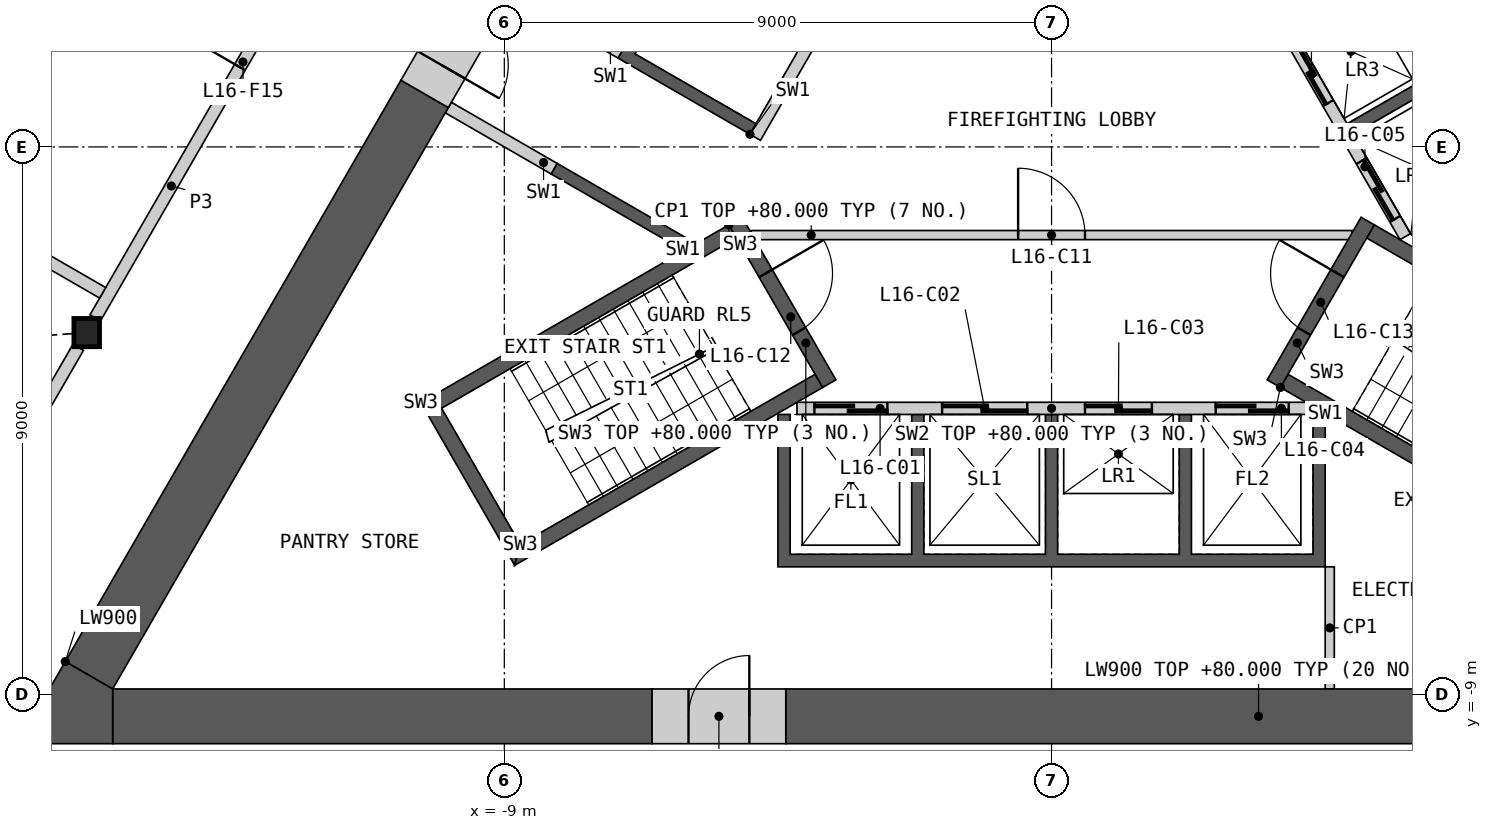
"""IFC4 building model, lengths in metres.
Left out: names, types, materials, properties, quantities, classifications, styles, units other than length and angle.
Written with IfcOpenShell. Run it as: python <this file> out.ifc"""

import sys

from ifc_helpers import new_model, si_unit, direction, frame, frame_2d, origin, origin_2d, place, context, subcontext, project, spatial, polyline, rectangle, i_section, outline, extrude, element, fill, save


model = new_model("IFC4")
c1 = context("Model", 3, precision=1e-05, world=origin(), true_north=direction((0.0, 1.0)))
c2 = subcontext(c1, "Body", "Model", "MODEL_VIEW")
j1 = project(units=[si_unit("LENGTHUNIT", "METRE"), si_unit("PLANEANGLEUNIT", "RADIAN")], contexts=[c1])
p1 = place(None, origin())
s1 = spatial("IfcSite", under=j1, at=p1, CompositionType="ELEMENT")
p2 = place(p1, origin())
s2 = spatial("IfcBuilding", under=s1, at=p2, CompositionType="ELEMENT")
p3 = place(p2, frame((0.0, 0.0, 76.2)))
s3 = spatial("IfcBuildingStorey", under=s2, at=p3, CompositionType="ELEMENT", Elevation=76.2)
p4 = place(p3, frame((-15.868, -3.054, 0.0), z_axis=(0.0, 0.0, 1.0), x_axis=(1.0, 0.0, 0.0)))
e1 = element("IfcColumn", 1, at=p4, inside=s3, PredefinedType="COLUMN", context=c2, shape_type="SweptSolid", body=[
    extrude(i_section(OverallWidth=0.421, OverallDepth=0.465, WebThickness=0.045, FlangeThickness=0.072, at=origin_2d()), origin(), (0.0, 0.0, 1.0), 4.2),
])
p5 = place(p3, origin())
e2 = element("IfcWall", 2, at=p5, inside=s3, PredefinedType="SHEAR", context=c2, shape_type="SweptSolid", body=[
    extrude(outline(polyline([(4.5, -4.4), (4.5, -6.906), (-4.5, -6.906), (-4.5, -4.4), (-4.3, -4.4), (-4.3, -6.7), (-2.3, -6.7), (-2.3, -4.4), (-2.1, -4.4), (-2.1, -6.7), (-0.1, -6.7), (-0.1, -4.4), (0.1, -4.4), (0.1, -6.7), (2.1, -6.7), (2.1, -4.4), (2.3, -4.4), (2.3, -6.7), (4.3, -6.7), (4.3, -4.4), (4.5, -4.4)])), origin(), (0.0, 0.0, 1.0), 3.8),
])
p6 = place(p3, frame((-4.187, -4.3, 0.0), z_axis=(0.0, 0.0, 1.0), x_axis=(1.0, 0.0, 0.0)))
e3 = element("IfcWall", 3, at=p6, inside=s3, PredefinedType="SOLIDWALL", context=c2, shape_type="SweptSolid", body=[
    extrude(rectangle(XDim=8.373, YDim=0.2, at=frame_2d((4.187, 0.0))), origin(), (0.0, 0.0, 1.0), 3.8),
])
p7 = place(p6, frame((0.287, 0.0, 0.0)))
e4 = element("IfcOpeningElement", 4, at=p7, cuts=e3, PredefinedType="OPENING", context=c2, shape_type="SweptSolid", body=[
    extrude(rectangle(XDim=1.2, YDim=2.1, at=frame_2d((0.6, 1.05))), frame((0.0, 0.11, 0.0), z_axis=(0.0, -1.0, 0.0), x_axis=(1.0, 0.0, 0.0)), (0.0, 0.0, 1.0), 0.22),
])
p8 = place(p6, frame((2.387, 0.0, 0.0)))
e5 = element("IfcOpeningElement", 5, at=p8, cuts=e3, PredefinedType="OPENING", context=c2, shape_type="SweptSolid", body=[
    extrude(rectangle(XDim=1.4, YDim=2.1, at=frame_2d((0.7, 1.05))), frame((0.0, 0.11, 0.0), z_axis=(0.0, -1.0, 0.0), x_axis=(1.0, 0.0, 0.0)), (0.0, 0.0, 1.0), 0.22),
])
p9 = place(p6, frame((4.737, 0.0, 0.0)))
e6 = element("IfcOpeningElement", 6, at=p9, cuts=e3, PredefinedType="OPENING", context=c2, shape_type="SweptSolid", body=[
    extrude(rectangle(XDim=1.1, YDim=2.1, at=frame_2d((0.55, 1.05))), frame((0.0, 0.11, 0.0), z_axis=(0.0, -1.0, 0.0), x_axis=(1.0, 0.0, 0.0)), (0.0, 0.0, 1.0), 0.22),
])
p10 = place(p6, frame((6.887, 0.0, 0.0)))
e7 = element("IfcOpeningElement", 7, at=p10, cuts=e3, PredefinedType="OPENING", context=c2, shape_type="SweptSolid", body=[
    extrude(rectangle(XDim=1.2, YDim=2.1, at=frame_2d((0.6, 1.05))), frame((0.0, 0.11, 0.0), z_axis=(0.0, -1.0, 0.0), x_axis=(1.0, 0.0, 0.0)), (0.0, 0.0, 1.0), 0.22),
])
p11 = place(p3, origin())
e8 = element("IfcWall", 8, at=p11, inside=s3, PredefinedType="SHEAR", context=c2, shape_type="SweptSolid", body=[
    extrude(outline(polyline([(2.66, 4.192), (4.831, 5.445), (8.231, -0.444), (6.061, -1.697), (5.96, -1.524), (7.952, -0.374), (6.952, 1.358), (4.96, 0.208), (4.861, 0.381), (6.852, 1.531), (5.852, 3.263), (3.861, 2.113), (3.76, 2.287), (5.752, 3.437), (4.752, 5.169), (2.76, 4.019), (2.66, 4.192)])), origin(), (0.0, 0.0, 1.0), 3.8),
])
p12 = place(p3, frame((5.817, -1.476, 0.0), z_axis=(0.0, 0.0, 1.0), x_axis=(-0.500002616675, 0.866023893041, 0.0)))
e9 = element("IfcWall", 9, at=p12, inside=s3, PredefinedType="SOLIDWALL", context=c2, shape_type="SweptSolid", body=[
    extrude(rectangle(XDim=8.373, YDim=0.2, at=frame_2d((4.187, 0.0))), origin(), (0.0, 0.0, 1.0), 3.8),
])
p13 = place(p12, frame((0.337, 0.0, 0.0)))
e10 = element("IfcOpeningElement", 10, at=p13, cuts=e9, PredefinedType="OPENING", context=c2, shape_type="SweptSolid", body=[
    extrude(rectangle(XDim=1.1, YDim=2.1, at=frame_2d((0.55, 1.05))), frame((0.0, 0.11, 0.0), z_axis=(0.0, -1.0, 0.0), x_axis=(1.0, 0.0, 0.0)), (0.0, 0.0, 1.0), 0.22),
])
p14 = place(p12, frame((2.537, 0.0, 0.0)))
e11 = element("IfcOpeningElement", 11, at=p14, cuts=e9, PredefinedType="OPENING", context=c2, shape_type="SweptSolid", body=[
    extrude(rectangle(XDim=1.1, YDim=2.1, at=frame_2d((0.55, 1.05))), frame((0.0, 0.11, 0.0), z_axis=(0.0, -1.0, 0.0), x_axis=(1.0, 0.0, 0.0)), (0.0, 0.0, 1.0), 0.22),
])
p15 = place(p12, frame((4.737, 0.0, 0.0)))
e12 = element("IfcOpeningElement", 12, at=p15, cuts=e9, PredefinedType="OPENING", context=c2, shape_type="SweptSolid", body=[
    extrude(rectangle(XDim=1.1, YDim=2.1, at=frame_2d((0.55, 1.05))), frame((0.0, 0.11, 0.0), z_axis=(0.0, -1.0, 0.0), x_axis=(1.0, 0.0, 0.0)), (0.0, 0.0, 1.0), 0.22),
])
p16 = place(p12, frame((7.037, 0.0, 0.0)))
e13 = element("IfcOpeningElement", 13, at=p16, cuts=e9, PredefinedType="OPENING", context=c2, shape_type="SweptSolid", body=[
    extrude(rectangle(XDim=0.9, YDim=2.1, at=frame_2d((0.45, 1.05))), frame((0.0, 0.11, 0.0), z_axis=(0.0, -1.0, 0.0), x_axis=(1.0, 0.0, 0.0)), (0.0, 0.0, 1.0), 0.22),
])
p17 = place(p3, origin())
e14 = element("IfcWall", 14, at=p17, inside=s3, PredefinedType="SHEAR", context=c2, shape_type="SweptSolid", body=[
    extrude(outline(polyline([(-6.061, -1.697), (-8.231, -0.444), (-8.131, -0.271), (-5.96, -1.524), (-6.061, -1.697)])), origin(), (0.0, 0.0, 1.0), 3.8),
])
p18 = place(p3, origin())
e15 = element("IfcWall", 15, at=p18, inside=s3, PredefinedType="SHEAR", context=c2, shape_type="SweptSolid", body=[
    extrude(outline(polyline([(-4.96, 0.208), (-7.131, 1.461), (-5.931, 3.54), (-3.76, 2.287), (-3.861, 2.113), (-5.852, 3.263), (-6.852, 1.531), (-4.861, 0.381), (-4.96, 0.208)])), origin(), (0.0, 0.0, 1.0), 3.8),
])
p19 = place(p3, frame((-1.631, 5.776, 0.0), z_axis=(0.0, 0.0, 1.0), x_axis=(-0.499992876559, -0.866029516466, 0.0)))
e16 = element("IfcWall", 16, at=p19, inside=s3, PredefinedType="SOLIDWALL", context=c2, shape_type="SweptSolid", body=[
    extrude(rectangle(XDim=6.486, YDim=0.2, at=frame_2d((3.243, 0.0))), origin(), (0.0, 0.0, 1.0), 3.8),
])
p20 = place(p19, frame((0.437, 0.0, 0.0)))
e17 = element("IfcOpeningElement", 17, at=p20, cuts=e16, PredefinedType="OPENING", context=c2, shape_type="SweptSolid", body=[
    extrude(rectangle(XDim=0.9, YDim=2.1, at=frame_2d((0.45, 1.05))), frame((0.0, 0.11, 0.0), z_axis=(0.0, -1.0, 0.0), x_axis=(1.0, 0.0, 0.0)), (0.0, 0.0, 1.0), 0.22),
])
p21 = place(p19, frame((2.637, 0.0, 0.0)))
e18 = element("IfcOpeningElement", 18, at=p21, cuts=e16, PredefinedType="OPENING", context=c2, shape_type="SweptSolid", body=[
    extrude(rectangle(XDim=0.9, YDim=2.1, at=frame_2d((0.45, 1.05))), frame((0.0, 0.11, 0.0), z_axis=(0.0, -1.0, 0.0), x_axis=(1.0, 0.0, 0.0)), (0.0, 0.0, 1.0), 0.22),
])
p22 = place(p3, frame((-7.081, 1.548, 0.0), z_axis=(0.0, 0.0, 1.0), x_axis=(-0.865983199114, 0.50007309351, 0.0)))
e19 = element("IfcWall", 19, at=p22, inside=s3, PredefinedType="SHEAR", context=c2, shape_type="SweptSolid", body=[
    extrude(rectangle(XDim=2.009, YDim=0.2, at=frame_2d((1.004, 0.0))), origin(), (0.0, 0.0, 1.0), 3.8),
])
p23 = place(p3, frame((-8.181, -0.357, 0.0), z_axis=(0.0, 0.0, 1.0), x_axis=(-0.866035824272, 0.499981950752, 0.0)))
e20 = element("IfcWall", 20, at=p23, inside=s3, PredefinedType="SHEAR", context=c2, shape_type="SweptSolid", body=[
    extrude(rectangle(XDim=2.009, YDim=0.2, at=frame_2d((1.004, 0.0))), origin(), (0.0, 0.0, 1.0), 3.8),
])
p24 = place(p3, frame((-4.941, -1.45, 0.0), z_axis=(0.0, 0.0, 1.0), x_axis=(1.0, 0.0, 0.0)))
e21 = element("IfcWall", 21, at=p24, inside=s3, PredefinedType="PARTITIONING", context=c2, shape_type="SweptSolid", body=[
    extrude(rectangle(XDim=9.882, YDim=0.15, at=frame_2d((4.941, 0.0))), origin(), (0.0, 0.0, 1.0), 3.8),
])
p25 = place(p24, frame((4.391, 0.0, 0.0)))
e22 = element("IfcOpeningElement", 22, at=p25, cuts=e21, PredefinedType="OPENING", context=c2, shape_type="SweptSolid", body=[
    extrude(rectangle(XDim=1.1, YDim=2.1, at=frame_2d((0.55, 1.05))), frame((0.0, 0.085, 0.0), z_axis=(0.0, -1.0, 0.0), x_axis=(1.0, 0.0, 0.0)), (0.0, 0.0, 1.0), 0.17),
])
p26 = place(p3, origin())
e23 = element("IfcWall", 23, at=p26, inside=s3, PredefinedType="SHEAR", context=c2, shape_type="SweptSolid", body=[
    extrude(outline(polyline([(-5.307, -1.281), (-10.374, -4.206), (-10.032, -4.298), (-5.182, -1.498), (-5.307, -1.281)])), origin(), (0.0, 0.0, 1.0), 3.8),
])
p27 = place(p3, origin())
e24 = element("IfcWall", 24, at=p27, inside=s3, PredefinedType="SHEAR", context=c2, shape_type="SweptSolid", body=[
    extrude(outline(polyline([(-10.374, -4.206), (-8.83, -6.881), (-8.738, -6.539), (-10.032, -4.298), (-10.374, -4.206)])), origin(), (0.0, 0.0, 1.0), 3.8),
])
p28 = place(p3, origin())
e25 = element("IfcWall", 25, at=p28, inside=s3, PredefinedType="SHEAR", context=c2, shape_type="SweptSolid", body=[
    extrude(outline(polyline([(-8.738, -6.539), (-8.83, -6.881), (-3.763, -3.956), (-3.888, -3.739), (-8.738, -6.539)])), origin(), (0.0, 0.0, 1.0), 3.8),
])
p29 = place(p3, frame((-5.199, -1.219, 0.0), z_axis=(0.0, 0.0, 1.0), x_axis=(0.499982516597, -0.866035497597, 0.0)))
e26 = element("IfcWall", 26, at=p29, inside=s3, PredefinedType="SHEAR", context=c2, shape_type="SweptSolid", body=[
    extrude(rectangle(XDim=3.088, YDim=0.25, at=frame_2d((1.544, 0.0))), origin(), (0.0, 0.0, 1.0), 3.8),
])
p30 = place(p29, frame((0.994, 0.0, 0.0)))
e27 = element("IfcOpeningElement", 27, at=p30, cuts=e26, PredefinedType="OPENING", context=c2, shape_type="SweptSolid", body=[
    extrude(rectangle(XDim=1.1, YDim=2.1, at=frame_2d((0.55, 1.05))), frame((0.0, 0.135, 0.0), z_axis=(0.0, -1.0, 0.0), x_axis=(1.0, 0.0, 0.0)), (0.0, 0.0, 1.0), 0.27),
])
p31 = place(p3, origin())
e28 = element("IfcWall", 28, at=p31, inside=s3, PredefinedType="SHEAR", context=c2, shape_type="SweptSolid", body=[
    extrude(outline(polyline([(3.763, -3.956), (8.83, -6.881), (8.738, -6.539), (3.888, -3.739), (3.763, -3.956)])), origin(), (0.0, 0.0, 1.0), 3.8),
])
p32 = place(p3, origin())
e29 = element("IfcWall", 29, at=p32, inside=s3, PredefinedType="SHEAR", context=c2, shape_type="SweptSolid", body=[
    extrude(outline(polyline([(10.032, -4.298), (10.374, -4.206), (5.307, -1.281), (5.182, -1.498), (10.032, -4.298)])), origin(), (0.0, 0.0, 1.0), 3.8),
])
p33 = place(p3, frame((3.655, -3.893, 0.0), z_axis=(0.0, 0.0, 1.0), x_axis=(0.499982516597, 0.866035497597, 0.0)))
e30 = element("IfcWall", 30, at=p33, inside=s3, PredefinedType="SHEAR", context=c2, shape_type="SweptSolid", body=[
    extrude(rectangle(XDim=3.088, YDim=0.25, at=frame_2d((1.544, 0.0))), origin(), (0.0, 0.0, 1.0), 3.8),
])
p34 = place(p33, frame((0.994, 0.0, 0.0)))
e31 = element("IfcOpeningElement", 31, at=p34, cuts=e30, PredefinedType="OPENING", context=c2, shape_type="SweptSolid", body=[
    extrude(rectangle(XDim=1.1, YDim=2.1, at=frame_2d((0.55, 1.05))), frame((0.0, 0.135, 0.0), z_axis=(0.0, -1.0, 0.0), x_axis=(1.0, 0.0, 0.0)), (0.0, 0.0, 1.0), 0.27),
])
p35 = place(p3, frame((4.575, -6.906, 0.0), z_axis=(0.0, 0.0, 1.0), x_axis=(0.0, -1.0, 0.0)))
e32 = element("IfcWall", 32, at=p35, inside=s3, PredefinedType="PARTITIONING", context=c2, shape_type="SweptSolid", body=[
    extrude(rectangle(XDim=2.009, YDim=0.15, at=frame_2d((1.004, 0.0))), origin(), (0.0, 0.0, 1.0), 3.8),
])
p36 = place(p3, frame((-4.371, -9.365, 0.0), z_axis=(0.0, 0.0, 1.0), x_axis=(1.0, 0.0, 0.0)))
e33 = element("IfcWall", 33, at=p36, inside=s3, PredefinedType="SHEAR", context=c2, shape_type="SweptSolid", body=[
    extrude(rectangle(XDim=15.55, YDim=0.9, at=frame_2d((7.775, 0.0))), origin(), (0.0, 0.0, 1.0), 3.8),
])
p37 = place(p3, frame((-15.441, -9.365, 0.0), z_axis=(0.0, 0.0, 1.0), x_axis=(1.0, 0.0, 0.0)))
e34 = element("IfcWall", 34, at=p37, inside=s3, PredefinedType="SHEAR", context=c2, shape_type="SweptSolid", body=[
    extrude(rectangle(XDim=8.871, YDim=0.9, at=frame_2d((4.435, 0.0))), origin(), (0.0, 0.0, 1.0), 3.8),
])
p38 = place(p3, frame((-10.31, 0.872, 0.0), z_axis=(0.0, 0.0, 1.0), x_axis=(-0.499991697393, -0.866030197244, 0.0)))
e35 = element("IfcWall", 35, at=p38, inside=s3, PredefinedType="SHEAR", context=c2, shape_type="SweptSolid", body=[
    extrude(rectangle(XDim=11.041, YDim=0.9, at=frame_2d((5.521, 0.0))), origin(), (0.0, 0.0, 1.0), 3.8),
])
p39 = place(p3, origin())
e36 = element("IfcWall", 36, at=p39, inside=s3, PredefinedType="SHEAR", context=c2, shape_type="SweptSolid", body=[
    extrude(outline(polyline([(-16.221, -8.465), (-15.441, -8.915), (-15.441, -9.815), (-17.0, -9.815), (-16.221, -8.465)])), origin(), (0.0, 0.0, 1.0), 3.8),
])
p40 = place(p3, frame((-6.571, -9.365, 0.0), z_axis=(0.0, 0.0, 1.0), x_axis=(1.0, 0.0, 0.0)))
e37 = element("IfcWall", 37, at=p40, inside=s3, PredefinedType="SHEAR", context=c2, shape_type="SweptSolid", body=[
    extrude(rectangle(XDim=2.2, YDim=0.9, at=frame_2d((1.1, 0.0))), origin(), (0.0, 0.0, 1.0), 3.8),
])
p41 = place(p40, frame((0.6, 0.0, 0.0)))
e38 = element("IfcOpeningElement", 38, at=p41, cuts=e37, PredefinedType="OPENING", context=c2, shape_type="SweptSolid", body=[
    extrude(rectangle(XDim=1.0, YDim=2.1, at=frame_2d((0.5, 1.05))), frame((0.0, 0.46, 0.0), z_axis=(0.0, -1.0, 0.0), x_axis=(1.0, 0.0, 0.0)), (0.0, 0.0, 1.0), 0.92),
])
p42 = place(p3, frame((-9.21, 2.777, 0.0), z_axis=(0.0, 0.0, 1.0), x_axis=(-0.500077893725, -0.86598042715, 0.0)))
e39 = element("IfcWall", 39, at=p42, inside=s3, PredefinedType="SHEAR", context=c2, shape_type="SweptSolid", body=[
    extrude(rectangle(XDim=2.2, YDim=0.9, at=frame_2d((1.1, 0.0))), origin(), (0.0, 0.0, 1.0), 3.8),
])
p43 = place(p42, frame((0.55, 0.0, 0.0)))
e40 = element("IfcOpeningElement", 40, at=p43, cuts=e39, PredefinedType="OPENING", context=c2, shape_type="SweptSolid", body=[
    extrude(rectangle(XDim=1.1, YDim=2.1, at=frame_2d((0.55, 1.05))), frame((0.0, 0.46, 0.0), z_axis=(0.0, -1.0, 0.0), x_axis=(1.0, 0.0, 0.0)), (0.0, 0.0, 1.0), 0.92),
])
p44 = place(p3, frame((-15.728, -2.811, 0.0), z_axis=(0.0, 0.0, 1.0), x_axis=(0.49999175339, 0.866030164915, 0.0)))
e41 = element("IfcWall", 41, at=p44, inside=s3, PredefinedType="PARTITIONING", context=c2, shape_type="SweptSolid", body=[
    extrude(rectangle(XDim=10.019, YDim=0.2, at=frame_2d((5.009, 0.0))), origin(), (0.0, 0.0, 1.0), 3.8),
])
p45 = place(p44, frame((4.76, 0.0, 0.0)))
e42 = element("IfcOpeningElement", 42, at=p45, cuts=e41, PredefinedType="OPENING", context=c2, shape_type="SweptSolid", body=[
    extrude(rectangle(XDim=1.0, YDim=2.1, at=frame_2d((0.5, 1.05))), frame((0.0, 0.11, 0.0), z_axis=(0.0, -1.0, 0.0), x_axis=(1.0, 0.0, 0.0)), (0.0, 0.0, 1.0), 0.22),
])
p46 = place(p3, frame((-19.244, -8.902, 0.0), z_axis=(0.0, 0.0, 1.0), x_axis=(0.499984737558, 0.86603421538, 0.0)))
e43 = element("IfcWall", 43, at=p46, inside=s3, PredefinedType="PARTITIONING", context=c2, shape_type="SweptSolid", body=[
    extrude(rectangle(XDim=6.473, YDim=0.2, at=frame_2d((3.236, 0.0))), origin(), (0.0, 0.0, 1.0), 3.8),
])
p47 = place(p46, frame((2.787, 0.0, 0.0)))
e44 = element("IfcOpeningElement", 44, at=p47, cuts=e43, PredefinedType="OPENING", context=c2, shape_type="SweptSolid", body=[
    extrude(rectangle(XDim=1.0, YDim=2.1, at=frame_2d((0.5, 1.05))), frame((0.0, 0.11, 0.0), z_axis=(0.0, -1.0, 0.0), x_axis=(1.0, 0.0, 0.0)), (0.0, 0.0, 1.0), 0.22),
])
p48 = place(p3, frame((-26.913, 4.129, 0.0), z_axis=(0.0, 0.0, 1.0), x_axis=(0.866026475891, -0.499998143053, 0.0)))
e45 = element("IfcWall", 45, at=p48, inside=s3, PredefinedType="PARTITIONING", context=c2, shape_type="SweptSolid", body=[
    extrude(rectangle(XDim=13.057, YDim=0.2, at=frame_2d((6.529, 0.0))), origin(), (0.0, 0.0, 1.0), 2.885),
])
p49 = place(p7, origin())
e46 = element("IfcDoor", 46, at=p49, inside=s3, OperationType="SLIDING_TO_LEFT", PredefinedType="DOOR", context=c2, shape_type="SweptSolid", body=[
    extrude(rectangle(XDim=1.2, YDim=2.1, at=frame_2d((0.6, 1.05))), frame((0.0, 0.025, 0.0), z_axis=(0.0, -1.0, 0.0), x_axis=(1.0, 0.0, 0.0)), (0.0, 0.0, 1.0), 0.05),
])
fill(e4, e46)
p50 = place(p8, origin())
e47 = element("IfcDoor", 47, at=p50, inside=s3, OperationType="SLIDING_TO_LEFT", PredefinedType="DOOR", context=c2, shape_type="SweptSolid", body=[
    extrude(rectangle(XDim=1.4, YDim=2.1, at=frame_2d((0.7, 1.05))), frame((0.0, 0.025, 0.0), z_axis=(0.0, -1.0, 0.0), x_axis=(1.0, 0.0, 0.0)), (0.0, 0.0, 1.0), 0.05),
])
fill(e5, e47)
p51 = place(p9, origin())
e48 = element("IfcDoor", 48, at=p51, inside=s3, OperationType="SLIDING_TO_LEFT", PredefinedType="DOOR", context=c2, shape_type="SweptSolid", body=[
    extrude(rectangle(XDim=1.1, YDim=2.1, at=frame_2d((0.55, 1.05))), frame((0.0, 0.025, 0.0), z_axis=(0.0, -1.0, 0.0), x_axis=(1.0, 0.0, 0.0)), (0.0, 0.0, 1.0), 0.05),
])
fill(e6, e48)
p52 = place(p10, origin())
e49 = element("IfcDoor", 49, at=p52, inside=s3, OperationType="SLIDING_TO_LEFT", PredefinedType="DOOR", context=c2, shape_type="SweptSolid", body=[
    extrude(rectangle(XDim=1.2, YDim=2.1, at=frame_2d((0.6, 1.05))), frame((0.0, 0.025, 0.0), z_axis=(0.0, -1.0, 0.0), x_axis=(1.0, 0.0, 0.0)), (0.0, 0.0, 1.0), 0.05),
])
fill(e7, e49)
p53 = place(p13, origin())
e50 = element("IfcDoor", 50, at=p53, inside=s3, OperationType="SLIDING_TO_LEFT", PredefinedType="DOOR", context=c2, shape_type="SweptSolid", body=[
    extrude(rectangle(XDim=1.1, YDim=2.1, at=frame_2d((0.55, 1.05))), frame((0.0, 0.025, 0.0), z_axis=(0.0, -1.0, 0.0), x_axis=(1.0, 0.0, 0.0)), (0.0, 0.0, 1.0), 0.05),
])
fill(e10, e50)
p54 = place(p14, origin())
e51 = element("IfcDoor", 51, at=p54, inside=s3, OperationType="SLIDING_TO_LEFT", PredefinedType="DOOR", context=c2, shape_type="SweptSolid", body=[
    extrude(rectangle(XDim=1.1, YDim=2.1, at=frame_2d((0.55, 1.05))), frame((0.0, 0.025, 0.0), z_axis=(0.0, -1.0, 0.0), x_axis=(1.0, 0.0, 0.0)), (0.0, 0.0, 1.0), 0.05),
])
fill(e11, e51)
p55 = place(p25, origin())
e52 = element("IfcDoor", 52, at=p55, inside=s3, OperationType="SINGLE_SWING_LEFT", PredefinedType="DOOR", context=c2, shape_type="SweptSolid", body=[
    extrude(rectangle(XDim=1.1, YDim=2.1, at=frame_2d((0.55, 1.05))), frame((0.0, 0.025, 0.0), z_axis=(0.0, -1.0, 0.0), x_axis=(1.0, 0.0, 0.0)), (0.0, 0.0, 1.0), 0.05),
])
fill(e22, e52)
p56 = place(p30, origin())
e53 = element("IfcDoor", 53, at=p56, inside=s3, OperationType="SINGLE_SWING_LEFT", PredefinedType="DOOR", context=c2, shape_type="SweptSolid", body=[
    extrude(rectangle(XDim=1.1, YDim=2.1, at=frame_2d((0.55, 1.05))), frame((0.0, 0.025, 0.0), z_axis=(0.0, -1.0, 0.0), x_axis=(1.0, 0.0, 0.0)), (0.0, 0.0, 1.0), 0.05),
])
fill(e27, e53)
p57 = place(p34, origin())
e54 = element("IfcDoor", 54, at=p57, inside=s3, OperationType="SINGLE_SWING_RIGHT", PredefinedType="DOOR", context=c2, shape_type="SweptSolid", body=[
    extrude(rectangle(XDim=1.1, YDim=2.1, at=frame_2d((0.55, 1.05))), frame((0.0, 0.025, 0.0), z_axis=(0.0, -1.0, 0.0), x_axis=(1.0, 0.0, 0.0)), (0.0, 0.0, 1.0), 0.05),
])
fill(e31, e54)
p58 = place(p41, origin())
e55 = element("IfcDoor", 55, at=p58, inside=s3, OperationType="SINGLE_SWING_RIGHT", PredefinedType="DOOR", context=c2, shape_type="SweptSolid", body=[
    extrude(rectangle(XDim=1.0, YDim=2.1, at=frame_2d((0.5, 1.05))), frame((0.0, 0.205, 0.0), z_axis=(0.0, -1.0, 0.0), x_axis=(1.0, 0.0, 0.0)), (0.0, 0.0, 1.0), 0.05),
])
fill(e38, e55)
p59 = place(p43, origin())
e56 = element("IfcDoor", 56, at=p59, inside=s3, OperationType="SINGLE_SWING_RIGHT", PredefinedType="DOOR", context=c2, shape_type="SweptSolid", body=[
    extrude(rectangle(XDim=1.1, YDim=2.1, at=frame_2d((0.55, 1.05))), frame((0.0, 0.205, 0.0), z_axis=(0.0, -1.0, 0.0), x_axis=(1.0, 0.0, 0.0)), (0.0, 0.0, 1.0), 0.05),
])
fill(e40, e56)
p60 = place(p45, origin())
e57 = element("IfcDoor", 57, at=p60, inside=s3, OperationType="SINGLE_SWING_LEFT", PredefinedType="DOOR", context=c2, shape_type="SweptSolid", body=[
    extrude(rectangle(XDim=1.0, YDim=2.1, at=frame_2d((0.5, 1.05))), frame((0.0, 0.025, 0.0), z_axis=(0.0, -1.0, 0.0), x_axis=(1.0, 0.0, 0.0)), (0.0, 0.0, 1.0), 0.05),
])
fill(e42, e57)
save(model, sys.argv[1])
